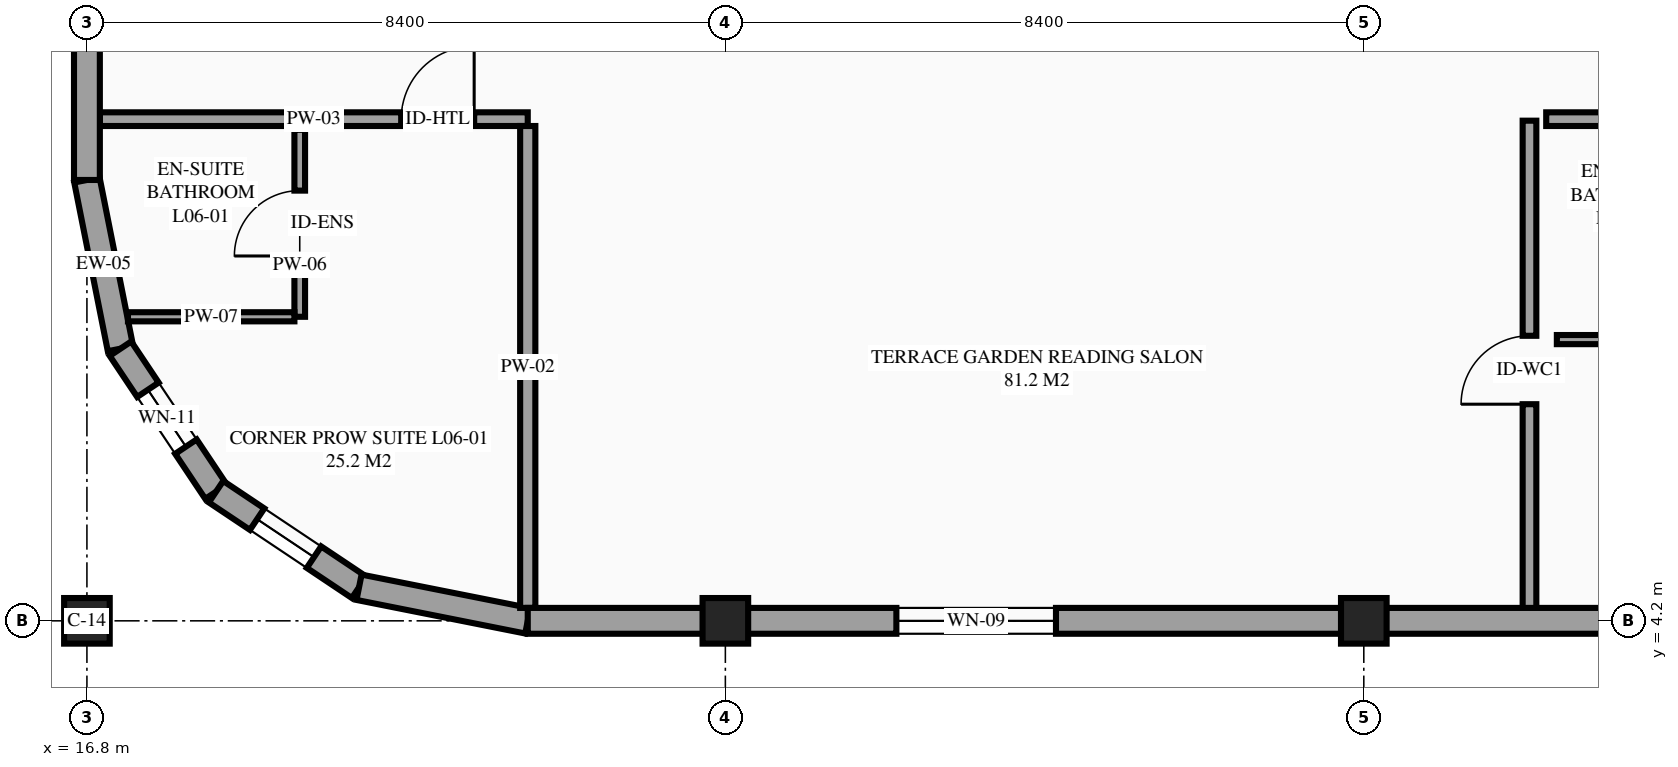
"""IFC4 building model, lengths in metres.
Left out: names, types, materials, properties, quantities, classifications, styles, units other than length and angle.
Written with IfcOpenShell. Run it as: python <this file> out.ifc"""

import sys

from ifc_helpers import new_model, si_unit, direction, frame, frame_2d, origin, origin_2d, place, context, subcontext, project, spatial, rectangle, extrude, element, fill, save


model = new_model("IFC4")
c1 = context("Model", 3, precision=1e-05, world=origin(), true_north=direction((0.0, 1.0)))
c2 = subcontext(c1, "Body", "Model", "MODEL_VIEW")
j1 = project(units=[si_unit("LENGTHUNIT", "METRE"), si_unit("PLANEANGLEUNIT", "RADIAN")], contexts=[c1])
p1 = place(None, origin())
s1 = spatial("IfcSite", under=j1, at=p1, CompositionType="ELEMENT")
p2 = place(p1, origin())
s2 = spatial("IfcBuilding", under=s1, at=p2, CompositionType="ELEMENT")
p3 = place(p2, frame((0.0, 0.0, 25.5)))
s3 = spatial("IfcBuildingStorey", under=s2, at=p3, CompositionType="ELEMENT", Elevation=25.5)
for number, where, z_axis, x_axis in (
    (1, (16.8, 4.2, 0.0), (0.0, 0.0, 1.0), (1.0, 0.0, 0.0)),
    (2, (25.2, 4.2, 0.0), (0.0, 0.0, 1.0), (1.0, 0.0, 0.0)),
    (3, (33.6, 4.2, 0.0), (0.0, 0.0, 1.0), (1.0, 0.0, 0.0)),
):
    element("IfcColumn", number, at=place(p3, frame(where, z_axis=z_axis, x_axis=x_axis)), inside=s3, PredefinedType="COLUMN", context=c2, shape_type="SweptSolid", body=[
        extrude(rectangle(XDim=0.6, YDim=0.6, at=origin_2d()), origin(), (0.0, 0.0, 1.0), 3.6),
    ])
p4 = place(p3, frame((16.8, 10.0, 0.0), z_axis=(0.0, 0.0, 1.0), x_axis=(0.195057908159, -0.980791727363, 0.0)))
e4 = element("IfcWall", 4, at=p4, inside=s3, PredefinedType="STANDARD", context=c2, shape_type="SweptSolid", body=[
    extrude(rectangle(XDim=2.263, YDim=0.34, at=frame_2d((1.131, 0.0))), origin(), (0.0, 0.0, 1.0), 3.07),
])
p5 = place(p3, frame((17.241, 7.781, 0.0), z_axis=(0.0, 0.0, 1.0), x_axis=(0.555546297918, -0.831485604728, 0.0)))
e5 = element("IfcWall", 5, at=p5, inside=s3, PredefinedType="STANDARD", context=c2, shape_type="SweptSolid", body=[
    extrude(rectangle(XDim=2.263, YDim=0.34, at=frame_2d((1.132, 0.0))), origin(), (0.0, 0.0, 1.0), 3.6),
])
p6 = place(p5, frame((0.65, 0.0, 0.75)))
e6 = element("IfcOpeningElement", 6, at=p6, cuts=e5, PredefinedType="OPENING", context=c2, shape_type="SweptSolid", body=[
    extrude(rectangle(XDim=0.9, YDim=1.55, at=frame_2d((0.45, 0.775))), frame((0.0, 0.18, 0.0), z_axis=(0.0, -1.0, 0.0), x_axis=(1.0, 0.0, 0.0)), (0.0, 0.0, 1.0), 0.36),
])
p7 = place(p3, frame((18.499, 5.899, 0.0), z_axis=(0.0, 0.0, 1.0), x_axis=(0.831502143458, -0.555521543618, 0.0)))
e7 = element("IfcWall", 7, at=p7, inside=s3, PredefinedType="STANDARD", context=c2, shape_type="SweptSolid", body=[
    extrude(rectangle(XDim=2.263, YDim=0.34, at=frame_2d((1.131, 0.0))), origin(), (0.0, 0.0, 1.0), 3.6),
])
p8 = place(p7, frame((0.65, 0.0, 0.75)))
e8 = element("IfcOpeningElement", 8, at=p8, cuts=e7, PredefinedType="OPENING", context=c2, shape_type="SweptSolid", body=[
    extrude(rectangle(XDim=0.9, YDim=1.55, at=frame_2d((0.45, 0.775))), frame((0.0, 0.18, 0.0), z_axis=(0.0, -1.0, 0.0), x_axis=(1.0, 0.0, 0.0)), (0.0, 0.0, 1.0), 0.36),
])
p9 = place(p3, frame((20.38, 4.642, 0.0), z_axis=(0.0, 0.0, 1.0), x_axis=(0.98077519094, -0.195141038321, 0.0)))
e9 = element("IfcWall", 9, at=p9, inside=s3, PredefinedType="STANDARD", context=c2, shape_type="SweptSolid", body=[
    extrude(rectangle(XDim=2.263, YDim=0.34, at=frame_2d((1.132, 0.0))), origin(), (0.0, 0.0, 1.0), 2.53),
])
p10 = place(p3, frame((16.97, 10.8, 0.0), z_axis=(0.0, 0.0, 1.0), x_axis=(1.0, 0.0, 0.0)))
e10 = element("IfcWall", 10, at=p10, inside=s3, PredefinedType="PARTITIONING", context=c2, shape_type="SweptSolid", body=[
    extrude(rectangle(XDim=5.63, YDim=0.18, at=frame_2d((2.815, 0.0))), origin(), (0.0, 0.0, 1.0), 3.375),
])
p11 = place(p10, frame((3.965, 0.0, 0.0)))
e11 = element("IfcOpeningElement", 11, at=p11, cuts=e10, PredefinedType="OPENING", context=c2, shape_type="SweptSolid", body=[
    extrude(rectangle(XDim=0.96, YDim=2.15, at=frame_2d((0.48, 1.075))), frame((0.0, 0.1, 0.0), z_axis=(0.0, -1.0, 0.0), x_axis=(1.0, 0.0, 0.0)), (0.0, 0.0, 1.0), 0.2),
])
p12 = place(p3, frame((22.6, 4.37, 0.0), z_axis=(0.0, 0.0, 1.0), x_axis=(0.0, 1.0, 0.0)))
e12 = element("IfcWall", 12, at=p12, inside=s3, PredefinedType="PARTITIONING", context=c2, shape_type="SweptSolid", body=[
    extrude(rectangle(XDim=6.34, YDim=0.2, at=frame_2d((3.17, 0.0))), origin(), (0.0, 0.0, 1.0), 3.375),
])
p13 = place(p3, frame((19.6, 8.2, 0.0), z_axis=(0.0, 0.0, 1.0), x_axis=(0.0, 1.0, 0.0)))
e13 = element("IfcWall", 13, at=p13, inside=s3, PredefinedType="PARTITIONING", context=c2, shape_type="SweptSolid", body=[
    extrude(rectangle(XDim=2.46, YDim=0.14, at=frame_2d((1.23, 0.0))), origin(), (0.0, 0.0, 1.0), 3.375),
])
p14 = place(p13, frame((0.8, 0.0, 0.0)))
e14 = element("IfcOpeningElement", 14, at=p14, cuts=e13, PredefinedType="OPENING", context=c2, shape_type="SweptSolid", body=[
    extrude(rectangle(XDim=0.86, YDim=2.1, at=frame_2d((0.43, 1.05))), frame((0.0, 0.08, 0.0), z_axis=(0.0, -1.0, 0.0), x_axis=(1.0, 0.0, 0.0)), (0.0, 0.0, 1.0), 0.16),
])
p15 = place(p3, frame((17.34, 8.2, 0.0), z_axis=(0.0, 0.0, 1.0), x_axis=(1.0, 0.0, 0.0)))
e15 = element("IfcWall", 15, at=p15, inside=s3, PredefinedType="PARTITIONING", context=c2, shape_type="SweptSolid", body=[
    extrude(rectangle(XDim=2.19, YDim=0.12, at=frame_2d((1.095, 0.0))), origin(), (0.0, 0.0, 1.0), 3.375),
])
p16 = place(p3, frame((36.0, 10.8, 0.0), z_axis=(0.0, 0.0, 1.0), x_axis=(1.0, 0.0, 0.0)))
e16 = element("IfcWall", 16, at=p16, inside=s3, PredefinedType="PARTITIONING", context=c2, shape_type="SweptSolid", body=[
    extrude(rectangle(XDim=6.58, YDim=0.18, at=frame_2d((3.29, 0.0))), origin(), (0.0, 0.0, 1.0), 3.375),
])
p17 = place(p16, frame((3.5, 0.0, 0.0)))
e17 = element("IfcOpeningElement", 17, at=p17, cuts=e16, PredefinedType="OPENING", context=c2, shape_type="SweptSolid", body=[
    extrude(rectangle(XDim=1.02, YDim=2.15, at=frame_2d((0.51, 1.075))), frame((0.0, 0.1, 0.0), z_axis=(0.0, -1.0, 0.0), x_axis=(1.0, 0.0, 0.0)), (0.0, 0.0, 1.0), 0.2),
])
p18 = place(p3, frame((36.14, 7.9, 0.0), z_axis=(0.0, 0.0, 1.0), x_axis=(1.0, 0.0, 0.0)))
e18 = element("IfcWall", 18, at=p18, inside=s3, PredefinedType="PARTITIONING", context=c2, shape_type="SweptSolid", body=[
    extrude(rectangle(XDim=2.49, YDim=0.12, at=frame_2d((1.245, 0.0))), origin(), (0.0, 0.0, 1.0), 3.375),
])
p19 = place(p3, frame((35.78, 4.22, 0.0), z_axis=(0.0, 0.0, 1.0), x_axis=(0.0, 1.0, 0.0)))
e19 = element("IfcWall", 19, at=p19, inside=s3, PredefinedType="PARTITIONING", context=c2, shape_type="SweptSolid", body=[
    extrude(rectangle(XDim=6.56, YDim=0.18, at=frame_2d((3.28, 0.0))), origin(), (0.0, 0.0, 1.0), 3.375),
])
p20 = place(p19, frame((2.83, 0.0, 0.0)))
e20 = element("IfcOpeningElement", 20, at=p20, cuts=e19, PredefinedType="OPENING", context=c2, shape_type="SweptSolid", body=[
    extrude(rectangle(XDim=0.9, YDim=2.12, at=frame_2d((0.45, 1.06))), frame((0.0, 0.1, 0.0), z_axis=(0.0, -1.0, 0.0), x_axis=(1.0, 0.0, 0.0)), (0.0, 0.0, 1.0), 0.2),
])
p21 = place(p3, frame((22.6, 4.2, 0.0), z_axis=(0.0, 0.0, 1.0), x_axis=(1.0, 0.0, 0.0)))
e21 = element("IfcWall", 21, at=p21, inside=s3, PredefinedType="STANDARD", context=c2, shape_type="SweptSolid", body=[
    extrude(rectangle(XDim=2.6, YDim=0.34, at=frame_2d((1.3, 0.0))), origin(), (0.0, 0.0, 1.0), 2.53),
])
p22 = place(p3, frame((25.2, 4.2, 0.0), z_axis=(0.0, 0.0, 1.0), x_axis=(1.0, 0.0, 0.0)))
e22 = element("IfcWall", 22, at=p22, inside=s3, PredefinedType="STANDARD", context=c2, shape_type="SweptSolid", body=[
    extrude(rectangle(XDim=8.4, YDim=0.34, at=frame_2d((4.2, 0.0))), origin(), (0.0, 0.0, 1.0), 2.63),
])
p23 = place(p22, frame((2.25, 0.0, 0.75)))
e23 = element("IfcOpeningElement", 23, at=p23, cuts=e22, PredefinedType="OPENING", context=c2, shape_type="SweptSolid", body=[
    extrude(rectangle(XDim=2.1, YDim=1.5, at=frame_2d((1.05, 0.75))), frame((0.0, 0.18, 0.0), z_axis=(0.0, -1.0, 0.0), x_axis=(1.0, 0.0, 0.0)), (0.0, 0.0, 1.0), 0.36),
])
p24 = place(p3, frame((33.6, 4.2, 0.0), z_axis=(0.0, 0.0, 1.0), x_axis=(1.0, 0.0, 0.0)))
e24 = element("IfcWall", 24, at=p24, inside=s3, PredefinedType="STANDARD", context=c2, shape_type="SweptSolid", body=[
    extrude(rectangle(XDim=8.4, YDim=0.34, at=frame_2d((4.2, 0.0))), origin(), (0.0, 0.0, 1.0), 3.07),
])
p25 = place(p24, frame((4.94, 0.0, 0.85)))
e25 = element("IfcOpeningElement", 25, at=p25, cuts=e24, PredefinedType="OPENING", context=c2, shape_type="SweptSolid", body=[
    extrude(rectangle(XDim=1.5, YDim=1.5, at=frame_2d((0.75, 0.75))), frame((0.0, 0.18, 0.0), z_axis=(0.0, -1.0, 0.0), x_axis=(1.0, 0.0, 0.0)), (0.0, 0.0, 1.0), 0.36),
])
p26 = place(p3, frame((16.8, 12.6, 0.0), z_axis=(0.0, 0.0, 1.0), x_axis=(0.0, -1.0, 0.0)))
e26 = element("IfcWall", 26, at=p26, inside=s3, PredefinedType="STANDARD", context=c2, shape_type="SweptSolid", body=[
    extrude(rectangle(XDim=2.6, YDim=0.34, at=frame_2d((1.3, 0.0))), origin(), (0.0, 0.0, 1.0), 3.07),
])
p27 = place(p6, origin())
e27 = element("IfcWindow", 27, at=p27, inside=s3, PartitioningType="SINGLE_PANEL", PredefinedType="WINDOW", context=c2, shape_type="SweptSolid", body=[
    extrude(rectangle(XDim=0.9, YDim=1.55, at=frame_2d((0.45, 0.775))), frame((0.0, 0.03, 0.0), z_axis=(0.0, -1.0, 0.0), x_axis=(1.0, 0.0, 0.0)), (0.0, 0.0, 1.0), 0.06),
])
fill(e6, e27)
p28 = place(p8, origin())
e28 = element("IfcWindow", 28, at=p28, inside=s3, PartitioningType="SINGLE_PANEL", PredefinedType="WINDOW", context=c2, shape_type="SweptSolid", body=[
    extrude(rectangle(XDim=0.9, YDim=1.55, at=frame_2d((0.45, 0.775))), frame((0.0, 0.03, 0.0), z_axis=(0.0, -1.0, 0.0), x_axis=(1.0, 0.0, 0.0)), (0.0, 0.0, 1.0), 0.06),
])
fill(e8, e28)
p29 = place(p23, origin())
e29 = element("IfcWindow", 29, at=p29, inside=s3, PartitioningType="SINGLE_PANEL", PredefinedType="WINDOW", context=c2, shape_type="SweptSolid", body=[
    extrude(rectangle(XDim=2.1, YDim=1.5, at=frame_2d((1.05, 0.75))), frame((0.0, 0.03, 0.0), z_axis=(0.0, -1.0, 0.0), x_axis=(1.0, 0.0, 0.0)), (0.0, 0.0, 1.0), 0.06),
])
fill(e23, e29)
p30 = place(p11, origin())
e30 = element("IfcDoor", 30, at=p30, inside=s3, OperationType="SINGLE_SWING_RIGHT", PredefinedType="DOOR", context=c2, shape_type="SweptSolid", body=[
    extrude(rectangle(XDim=0.96, YDim=2.15, at=frame_2d((0.48, 1.075))), frame((0.0, 0.025, 0.0), z_axis=(0.0, -1.0, 0.0), x_axis=(1.0, 0.0, 0.0)), (0.0, 0.0, 1.0), 0.05),
])
fill(e11, e30)
p31 = place(p14, origin())
e31 = element("IfcDoor", 31, at=p31, inside=s3, OperationType="SINGLE_SWING_LEFT", PredefinedType="DOOR", context=c2, shape_type="SweptSolid", body=[
    extrude(rectangle(XDim=0.86, YDim=2.1, at=frame_2d((0.43, 1.05))), frame((0.0, 0.025, 0.0), z_axis=(0.0, -1.0, 0.0), x_axis=(1.0, 0.0, 0.0)), (0.0, 0.0, 1.0), 0.05),
])
fill(e14, e31)
p32 = place(p20, origin())
e32 = element("IfcDoor", 32, at=p32, inside=s3, OperationType="SINGLE_SWING_LEFT", PredefinedType="DOOR", context=c2, shape_type="SweptSolid", body=[
    extrude(rectangle(XDim=0.9, YDim=2.12, at=frame_2d((0.45, 1.06))), frame((0.0, 0.025, 0.0), z_axis=(0.0, -1.0, 0.0), x_axis=(1.0, 0.0, 0.0)), (0.0, 0.0, 1.0), 0.05),
])
fill(e20, e32)
save(model, sys.argv[1])
